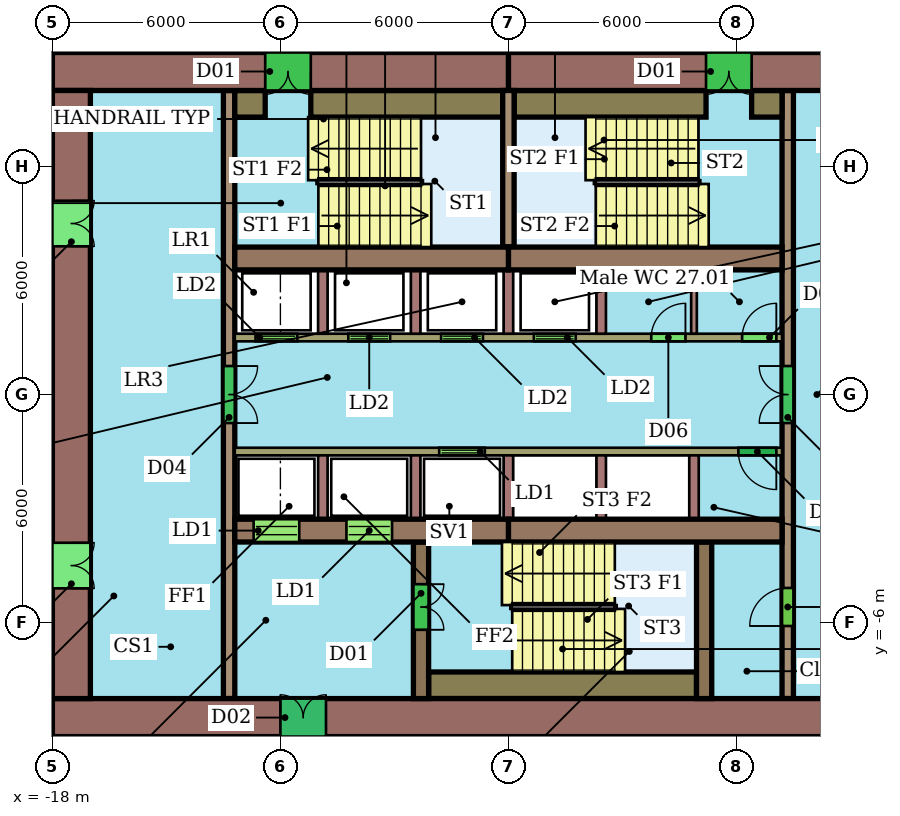
"""IFC4 building model, lengths in metres.
Left out: names, types, materials, properties, quantities, classifications, styles, units other than length and angle.
Written with IfcOpenShell. Run it as: python <this file> out.ifc"""

import sys

from ifc_helpers import new_model, si_unit, direction, frame, frame_2d, origin, place, context, subcontext, project, spatial, rectangle, extrude, element, fill, save


model = new_model("IFC4")
c1 = context("Model", 3, precision=1e-05, world=origin(), true_north=direction((0.0, 1.0)))
c2 = subcontext(c1, "Body", "Model", "MODEL_VIEW")
j1 = project(units=[si_unit("LENGTHUNIT", "METRE"), si_unit("PLANEANGLEUNIT", "RADIAN")], contexts=[c1])
p1 = place(None, origin())
s1 = spatial("IfcSite", under=j1, at=p1, CompositionType="ELEMENT")
p2 = place(p1, origin())
s2 = spatial("IfcBuilding", under=s1, at=p2, CompositionType="ELEMENT")
p3 = place(p2, frame((0.0, 0.0, 117.4)))
s3 = spatial("IfcBuildingStorey", under=s2, at=p3, CompositionType="ELEMENT", Elevation=117.4)
p4 = place(p3, frame((6.0, 8.5, 0.0), z_axis=(0.0, 0.0, 1.0), x_axis=(-1.0, 0.0, 0.0)))
e1 = element("IfcWall", 1, at=p4, inside=s3, PredefinedType="SHEAR", context=c2, shape_type="SweptSolid", body=[
    extrude(rectangle(XDim=12.0, YDim=1.0, at=frame_2d((6.0, 0.0))), origin(), (0.0, 0.0, 1.0), 3.3),
])
p5 = place(p4, frame((5.6, 0.0, 0.0)))
e2 = element("IfcOpeningElement", 2, at=p5, cuts=e1, PredefinedType="OPENING", context=c2, shape_type="SweptSolid", body=[
    extrude(rectangle(XDim=1.2, YDim=2.1, at=frame_2d((0.6, 1.05))), frame((0.0, 0.51, 0.0), z_axis=(0.0, -1.0, 0.0), x_axis=(1.0, 0.0, 0.0)), (0.0, 0.0, 1.0), 1.02),
])
p6 = place(p3, frame((-6.0, 8.5, 0.0), z_axis=(0.0, 0.0, 1.0), x_axis=(-1.0, 0.0, 0.0)))
e3 = element("IfcWall", 3, at=p6, inside=s3, PredefinedType="SHEAR", context=c2, shape_type="SweptSolid", body=[
    extrude(rectangle(XDim=12.0, YDim=1.0, at=frame_2d((6.0, 0.0))), origin(), (0.0, 0.0, 1.0), 3.3),
])
p7 = place(p6, frame((5.2, 0.0, 0.0)))
e4 = element("IfcOpeningElement", 4, at=p7, cuts=e3, PredefinedType="OPENING", context=c2, shape_type="SweptSolid", body=[
    extrude(rectangle(XDim=1.2, YDim=2.1, at=frame_2d((0.6, 1.05))), frame((0.0, 0.51, 0.0), z_axis=(0.0, -1.0, 0.0), x_axis=(1.0, 0.0, 0.0)), (0.0, 0.0, 1.0), 1.02),
])
p8 = place(p3, frame((-18.0, -8.5, 0.0), z_axis=(0.0, 0.0, 1.0), x_axis=(1.0, 0.0, 0.0)))
e5 = element("IfcWall", 5, at=p8, inside=s3, PredefinedType="SHEAR", context=c2, shape_type="SweptSolid", body=[
    extrude(rectangle(XDim=24.0, YDim=1.0, at=frame_2d((12.0, 0.0))), origin(), (0.0, 0.0, 1.0), 3.3),
])
p9 = place(p8, frame((6.0, 0.0, 0.0)))
e6 = element("IfcOpeningElement", 6, at=p9, cuts=e5, PredefinedType="OPENING", context=c2, shape_type="SweptSolid", body=[
    extrude(rectangle(XDim=1.2, YDim=2.1, at=frame_2d((0.6, 1.05))), frame((0.0, 0.51, 0.0), z_axis=(0.0, -1.0, 0.0), x_axis=(1.0, 0.0, 0.0)), (0.0, 0.0, 1.0), 1.02),
])
p10 = place(p3, frame((-17.5, 8.0, 0.0), z_axis=(0.0, 0.0, 1.0), x_axis=(0.0, -1.0, 0.0)))
e7 = element("IfcWall", 7, at=p10, inside=s3, PredefinedType="SHEAR", context=c2, shape_type="SweptSolid", body=[
    extrude(rectangle(XDim=16.0, YDim=1.0, at=frame_2d((8.0, 0.0))), origin(), (0.0, 0.0, 1.0), 3.3),
])
p11 = place(p10, frame((11.9, 0.0, 0.0)))
e8 = element("IfcOpeningElement", 8, at=p11, cuts=e7, PredefinedType="OPENING", context=c2, shape_type="SweptSolid", body=[
    extrude(rectangle(XDim=1.2, YDim=2.1, at=frame_2d((0.6, 1.05))), frame((0.0, 0.51, 0.0), z_axis=(0.0, -1.0, 0.0), x_axis=(1.0, 0.0, 0.0)), (0.0, 0.0, 1.0), 1.02),
])
p12 = place(p10, frame((2.9, 0.0, 0.0)))
e9 = element("IfcOpeningElement", 9, at=p12, cuts=e7, PredefinedType="OPENING", context=c2, shape_type="SweptSolid", body=[
    extrude(rectangle(XDim=1.2, YDim=2.1, at=frame_2d((0.6, 1.05))), frame((0.0, 0.51, 0.0), z_axis=(0.0, -1.0, 0.0), x_axis=(1.0, 0.0, 0.0)), (0.0, 0.0, 1.0), 1.02),
])
for number, where, z_axis, x_axis in (
    (10, (-13.2, 3.58, 0.0), (0.0, 0.0, 1.0), (1.0, 0.0, 0.0)),
    (11, (-6.0, 3.58, 0.0), (0.0, 0.0, 1.0), (1.0, 0.0, 0.0)),
):
    element("IfcWall", number, at=place(p3, frame(where, z_axis=z_axis, x_axis=x_axis)), inside=s3, PredefinedType="SHEAR", context=c2, shape_type="SweptSolid", body=[
        extrude(rectangle(XDim=7.2, YDim=0.6, at=frame_2d((3.6, 0.0))), origin(), (0.0, 0.0, 1.0), 3.3),
    ])
p13 = place(p3, frame((-13.2, -3.58, 0.0), z_axis=(0.0, 0.0, 1.0), x_axis=(1.0, 0.0, 0.0)))
e12 = element("IfcWall", 12, at=p13, inside=s3, PredefinedType="SHEAR", context=c2, shape_type="SweptSolid", body=[
    extrude(rectangle(XDim=7.2, YDim=0.6, at=frame_2d((3.6, 0.0))), origin(), (0.0, 0.0, 1.0), 3.3),
])
p14 = place(p13, frame((0.496, 0.0, 0.0)))
e13 = element("IfcOpeningElement", 13, at=p14, cuts=e12, PredefinedType="OPENING", context=c2, shape_type="SweptSolid", body=[
    extrude(rectangle(XDim=1.2, YDim=2.1, at=frame_2d((0.6, 1.05))), frame((0.0, 0.31, 0.0), z_axis=(0.0, -1.0, 0.0), x_axis=(1.0, 0.0, 0.0)), (0.0, 0.0, 1.0), 0.62),
])
p15 = place(p13, frame((2.938, 0.0, 0.0)))
e14 = element("IfcOpeningElement", 14, at=p15, cuts=e12, PredefinedType="OPENING", context=c2, shape_type="SweptSolid", body=[
    extrude(rectangle(XDim=1.2, YDim=2.1, at=frame_2d((0.6, 1.05))), frame((0.0, 0.31, 0.0), z_axis=(0.0, -1.0, 0.0), x_axis=(1.0, 0.0, 0.0)), (0.0, 0.0, 1.0), 0.62),
])
p16 = place(p3, frame((-6.0, -3.58, 0.0), z_axis=(0.0, 0.0, 1.0), x_axis=(1.0, 0.0, 0.0)))
e15 = element("IfcWall", 15, at=p16, inside=s3, PredefinedType="SHEAR", context=c2, shape_type="SweptSolid", body=[
    extrude(rectangle(XDim=7.2, YDim=0.6, at=frame_2d((3.6, 0.0))), origin(), (0.0, 0.0, 1.0), 3.3),
])
p17 = place(p3, frame((-13.35, 8.0, 0.0), z_axis=(0.0, 0.0, 1.0), x_axis=(0.0, -1.0, 0.0)))
e16 = element("IfcWall", 16, at=p17, inside=s3, PredefinedType="SHEAR", context=c2, shape_type="SweptSolid", body=[
    extrude(rectangle(XDim=16.0, YDim=0.3, at=frame_2d((8.0, 0.0))), origin(), (0.0, 0.0, 1.0), 3.3),
])
p18 = place(p17, frame((7.25, 0.0, 0.0)))
e17 = element("IfcOpeningElement", 17, at=p18, cuts=e16, PredefinedType="OPENING", context=c2, shape_type="SweptSolid", body=[
    extrude(rectangle(XDim=1.5, YDim=2.1, at=frame_2d((0.75, 1.05))), frame((0.0, 0.16, 0.0), z_axis=(0.0, -1.0, 0.0), x_axis=(1.0, 0.0, 0.0)), (0.0, 0.0, 1.0), 0.32),
])
p19 = place(p3, frame((1.35, -8.0, 0.0), z_axis=(0.0, 0.0, 1.0), x_axis=(0.0, 1.0, 0.0)))
e18 = element("IfcWall", 18, at=p19, inside=s3, PredefinedType="SHEAR", context=c2, shape_type="SweptSolid", body=[
    extrude(rectangle(XDim=16.0, YDim=0.3, at=frame_2d((8.0, 0.0))), origin(), (0.0, 0.0, 1.0), 3.3),
])
p20 = place(p19, frame((1.91, 0.0, 0.0)))
e19 = element("IfcOpeningElement", 19, at=p20, cuts=e18, PredefinedType="OPENING", context=c2, shape_type="SweptSolid", body=[
    extrude(rectangle(XDim=1.0, YDim=2.1, at=frame_2d((0.5, 1.05))), frame((0.0, 0.16, 0.0), z_axis=(0.0, -1.0, 0.0), x_axis=(1.0, 0.0, 0.0)), (0.0, 0.0, 1.0), 0.32),
])
p21 = place(p19, frame((7.25, 0.0, 0.0)))
e20 = element("IfcOpeningElement", 20, at=p21, cuts=e18, PredefinedType="OPENING", context=c2, shape_type="SweptSolid", body=[
    extrude(rectangle(XDim=1.5, YDim=2.1, at=frame_2d((0.75, 1.05))), frame((0.0, 0.16, 0.0), z_axis=(0.0, -1.0, 0.0), x_axis=(1.0, 0.0, 0.0)), (0.0, 0.0, 1.0), 0.32),
])
p22 = place(p3, frame((-13.2, 1.5, 0.0), z_axis=(0.0, 0.0, 1.0), x_axis=(1.0, 0.0, 0.0)))
e21 = element("IfcWall", 21, at=p22, inside=s3, PredefinedType="SHEAR", context=c2, shape_type="SweptSolid", body=[
    extrude(rectangle(XDim=14.4, YDim=0.2, at=frame_2d((7.2, 0.0))), origin(), (0.0, 0.0, 1.0), 3.3),
])
p23 = place(p22, frame((0.546, 0.0, 0.0)))
e22 = element("IfcOpeningElement", 22, at=p23, cuts=e21, PredefinedType="OPENING", context=c2, shape_type="SweptSolid", body=[
    extrude(rectangle(XDim=1.1, YDim=2.1, at=frame_2d((0.55, 1.05))), frame((0.0, 0.11, 0.0), z_axis=(0.0, -1.0, 0.0), x_axis=(1.0, 0.0, 0.0)), (0.0, 0.0, 1.0), 0.22),
])
p24 = place(p22, frame((2.988, 0.0, 0.0)))
e23 = element("IfcOpeningElement", 23, at=p24, cuts=e21, PredefinedType="OPENING", context=c2, shape_type="SweptSolid", body=[
    extrude(rectangle(XDim=1.1, YDim=2.1, at=frame_2d((0.55, 1.05))), frame((0.0, 0.11, 0.0), z_axis=(0.0, -1.0, 0.0), x_axis=(1.0, 0.0, 0.0)), (0.0, 0.0, 1.0), 0.22),
])
p25 = place(p22, frame((5.429, 0.0, 0.0)))
e24 = element("IfcOpeningElement", 24, at=p25, cuts=e21, PredefinedType="OPENING", context=c2, shape_type="SweptSolid", body=[
    extrude(rectangle(XDim=1.1, YDim=2.1, at=frame_2d((0.55, 1.05))), frame((0.0, 0.11, 0.0), z_axis=(0.0, -1.0, 0.0), x_axis=(1.0, 0.0, 0.0)), (0.0, 0.0, 1.0), 0.22),
])
p26 = place(p22, frame((7.871, 0.0, 0.0)))
e25 = element("IfcOpeningElement", 25, at=p26, cuts=e21, PredefinedType="OPENING", context=c2, shape_type="SweptSolid", body=[
    extrude(rectangle(XDim=1.1, YDim=2.1, at=frame_2d((0.55, 1.05))), frame((0.0, 0.11, 0.0), z_axis=(0.0, -1.0, 0.0), x_axis=(1.0, 0.0, 0.0)), (0.0, 0.0, 1.0), 0.22),
])
p27 = place(p22, frame((10.958, 0.0, 0.0)))
e26 = element("IfcOpeningElement", 26, at=p27, cuts=e21, PredefinedType="OPENING", context=c2, shape_type="SweptSolid", body=[
    extrude(rectangle(XDim=0.9, YDim=2.1, at=frame_2d((0.45, 1.05))), frame((0.0, 0.11, 0.0), z_axis=(0.0, -1.0, 0.0), x_axis=(1.0, 0.0, 0.0)), (0.0, 0.0, 1.0), 0.22),
])
p28 = place(p22, frame((13.35, 0.0, 0.0)))
e27 = element("IfcOpeningElement", 27, at=p28, cuts=e21, PredefinedType="OPENING", context=c2, shape_type="SweptSolid", body=[
    extrude(rectangle(XDim=0.9, YDim=2.1, at=frame_2d((0.45, 1.05))), frame((0.0, 0.11, 0.0), z_axis=(0.0, -1.0, 0.0), x_axis=(1.0, 0.0, 0.0)), (0.0, 0.0, 1.0), 0.22),
])
p29 = place(p3, frame((1.2, -1.5, 0.0), z_axis=(0.0, 0.0, 1.0), x_axis=(-1.0, 0.0, 0.0)))
e28 = element("IfcWall", 28, at=p29, inside=s3, PredefinedType="SHEAR", context=c2, shape_type="SweptSolid", body=[
    extrude(rectangle(XDim=14.4, YDim=0.2, at=frame_2d((7.2, 0.0))), origin(), (0.0, 0.0, 1.0), 3.3),
])
p30 = place(p29, frame((7.821, 0.0, 0.0)))
e29 = element("IfcOpeningElement", 29, at=p30, cuts=e28, PredefinedType="OPENING", context=c2, shape_type="SweptSolid", body=[
    extrude(rectangle(XDim=1.2, YDim=2.1, at=frame_2d((0.6, 1.05))), frame((0.0, 0.11, 0.0), z_axis=(0.0, -1.0, 0.0), x_axis=(1.0, 0.0, 0.0)), (0.0, 0.0, 1.0), 0.22),
])
p31 = place(p29, frame((0.15, 0.0, 0.0)))
e30 = element("IfcOpeningElement", 30, at=p31, cuts=e28, PredefinedType="OPENING", context=c2, shape_type="SweptSolid", body=[
    extrude(rectangle(XDim=1.0, YDim=2.1, at=frame_2d((0.5, 1.05))), frame((0.0, 0.11, 0.0), z_axis=(0.0, -1.0, 0.0), x_axis=(1.0, 0.0, 0.0)), (0.0, 0.0, 1.0), 0.22),
])
p32 = place(p3, frame((-8.3, -3.88, 0.0), z_axis=(0.0, 0.0, 1.0), x_axis=(0.0, -1.0, 0.0)))
e31 = element("IfcWall", 31, at=p32, inside=s3, PredefinedType="SHEAR", context=c2, shape_type="SweptSolid", body=[
    extrude(rectangle(XDim=4.12, YDim=0.4, at=frame_2d((2.06, 0.0))), origin(), (0.0, 0.0, 1.0), 3.3),
])
p33 = place(p32, frame((1.11, 0.0, 0.0)))
e32 = element("IfcOpeningElement", 32, at=p33, cuts=e31, PredefinedType="OPENING", context=c2, shape_type="SweptSolid", body=[
    extrude(rectangle(XDim=1.2, YDim=2.1, at=frame_2d((0.6, 1.05))), frame((0.0, 0.21, 0.0), z_axis=(0.0, -1.0, 0.0), x_axis=(1.0, 0.0, 0.0)), (0.0, 0.0, 1.0), 0.42),
])
p34 = place(p3, frame((-0.85, -3.88, 0.0), z_axis=(0.0, 0.0, 1.0), x_axis=(0.0, -1.0, 0.0)))
e33 = element("IfcWall", 33, at=p34, inside=s3, PredefinedType="SHEAR", context=c2, shape_type="SweptSolid", body=[
    extrude(rectangle(XDim=4.12, YDim=0.4, at=frame_2d((2.06, 0.0))), origin(), (0.0, 0.0, 1.0), 3.3),
])
p35 = place(p3, frame((-6.0, 3.88, 0.0), z_axis=(0.0, 0.0, 1.0), x_axis=(0.0, 1.0, 0.0)))
e34 = element("IfcWall", 34, at=p35, inside=s3, PredefinedType="SHEAR", context=c2, shape_type="SweptSolid", body=[
    extrude(rectangle(XDim=4.12, YDim=0.3, at=frame_2d((2.06, 0.0))), origin(), (0.0, 0.0, 1.0), 3.3),
])
p36 = place(p3, frame((-13.2, 7.65, 0.0), z_axis=(0.0, 0.0, 1.0), x_axis=(1.0, 0.0, 0.0)))
e35 = element("IfcWall", 35, at=p36, inside=s3, PredefinedType="SHEAR", context=c2, shape_type="SweptSolid", body=[
    extrude(rectangle(XDim=0.8, YDim=0.7, at=frame_2d((0.4, 0.0))), origin(), (0.0, 0.0, 1.0), 3.3),
])
for number, where, z_axis, x_axis in (
    (36, (-11.2, 7.65, 0.0), (0.0, 0.0, 1.0), (1.0, 0.0, 0.0)),
    (37, (-5.85, 7.65, 0.0), (0.0, 0.0, 1.0), (1.0, 0.0, 0.0)),
):
    element("IfcWall", number, at=place(p3, frame(where, z_axis=z_axis, x_axis=x_axis)), inside=s3, PredefinedType="SHEAR", context=c2, shape_type="SweptSolid", body=[
        extrude(rectangle(XDim=5.05, YDim=0.7, at=frame_2d((2.525, 0.0))), origin(), (0.0, 0.0, 1.0), 3.3),
    ])
p37 = place(p3, frame((0.4, 7.65, 0.0), z_axis=(0.0, 0.0, 1.0), x_axis=(1.0, 0.0, 0.0)))
e38 = element("IfcWall", 38, at=p37, inside=s3, PredefinedType="SHEAR", context=c2, shape_type="SweptSolid", body=[
    extrude(rectangle(XDim=0.8, YDim=0.7, at=frame_2d((0.4, 0.0))), origin(), (0.0, 0.0, 1.0), 3.3),
])
p38 = place(p3, frame((-8.1, -7.65, 0.0), z_axis=(0.0, 0.0, 1.0), x_axis=(1.0, 0.0, 0.0)))
e39 = element("IfcWall", 39, at=p38, inside=s3, PredefinedType="SHEAR", context=c2, shape_type="SweptSolid", body=[
    extrude(rectangle(XDim=7.05, YDim=0.7, at=frame_2d((3.525, 0.0))), origin(), (0.0, 0.0, 1.0), 3.3),
])
for number, where, z_axis, x_axis in (
    (40, (-10.883, 1.6, 0.0), (0.0, 0.0, 1.0), (0.0, 1.0, 0.0)),
    (41, (-8.442, 1.6, 0.0), (0.0, 0.0, 1.0), (0.0, 1.0, 0.0)),
    (42, (-6.0, 1.6, 0.0), (0.0, 0.0, 1.0), (0.0, 1.0, 0.0)),
    (43, (-3.558, 1.6, 0.0), (0.0, 0.0, 1.0), (0.0, 1.0, 0.0)),
):
    element("IfcWall", number, at=place(p3, frame(where, z_axis=z_axis, x_axis=x_axis)), inside=s3, PredefinedType="SHEAR", context=c2, shape_type="SweptSolid", body=[
        extrude(rectangle(XDim=1.68, YDim=0.25, at=frame_2d((0.84, 0.0))), origin(), (0.0, 0.0, 1.0), 3.3),
    ])
p39 = place(p3, frame((-1.117, 1.6, 0.0), z_axis=(0.0, 0.0, 1.0), x_axis=(0.0, 1.0, 0.0)))
e44 = element("IfcWall", 44, at=p39, inside=s3, PredefinedType="PARTITIONING", context=c2, shape_type="SweptSolid", body=[
    extrude(rectangle(XDim=1.68, YDim=0.15, at=frame_2d((0.84, 0.0))), origin(), (0.0, 0.0, 1.0), 3.3),
])
for number, where, z_axis, x_axis in (
    (45, (-10.883, -1.6, 0.0), (0.0, 0.0, 1.0), (0.0, -1.0, 0.0)),
    (46, (-8.442, -1.6, 0.0), (0.0, 0.0, 1.0), (0.0, -1.0, 0.0)),
    (47, (-6.0, -1.6, 0.0), (0.0, 0.0, 1.0), (0.0, -1.0, 0.0)),
    (48, (-3.558, -1.6, 0.0), (0.0, 0.0, 1.0), (0.0, -1.0, 0.0)),
    (49, (-1.117, -1.6, 0.0), (0.0, 0.0, 1.0), (0.0, -1.0, 0.0)),
):
    element("IfcWall", number, at=place(p3, frame(where, z_axis=z_axis, x_axis=x_axis)), inside=s3, PredefinedType="SHEAR", context=c2, shape_type="SweptSolid", body=[
        extrude(rectangle(XDim=1.68, YDim=0.25, at=frame_2d((0.84, 0.0))), origin(), (0.0, 0.0, 1.0), 3.3),
    ])
p40 = place(p5, origin())
e50 = element("IfcDoor", 50, at=p40, inside=s3, OperationType="DOUBLE_DOOR_SINGLE_SWING", PredefinedType="NOTDEFINED", context=c2, shape_type="SweptSolid", body=[
    extrude(rectangle(XDim=1.2, YDim=2.1, at=frame_2d((0.6, 1.05))), frame((0.0, 0.025, 0.0), z_axis=(0.0, -1.0, 0.0), x_axis=(1.0, 0.0, 0.0)), (0.0, 0.0, 1.0), 0.05),
])
fill(e2, e50)
p41 = place(p7, origin())
e51 = element("IfcDoor", 51, at=p41, inside=s3, OperationType="DOUBLE_DOOR_SINGLE_SWING", PredefinedType="NOTDEFINED", context=c2, shape_type="SweptSolid", body=[
    extrude(rectangle(XDim=1.2, YDim=2.1, at=frame_2d((0.6, 1.05))), frame((0.0, 0.025, 0.0), z_axis=(0.0, -1.0, 0.0), x_axis=(1.0, 0.0, 0.0)), (0.0, 0.0, 1.0), 0.05),
])
fill(e4, e51)
p42 = place(p9, origin())
e52 = element("IfcDoor", 52, at=p42, inside=s3, OperationType="DOUBLE_DOOR_SINGLE_SWING", PredefinedType="NOTDEFINED", context=c2, shape_type="SweptSolid", body=[
    extrude(rectangle(XDim=1.2, YDim=2.1, at=frame_2d((0.6, 1.05))), frame((0.0, 0.025, 0.0), z_axis=(0.0, -1.0, 0.0), x_axis=(1.0, 0.0, 0.0)), (0.0, 0.0, 1.0), 0.05),
])
fill(e6, e52)
p43 = place(p11, origin())
e53 = element("IfcDoor", 53, at=p43, inside=s3, OperationType="DOUBLE_DOOR_SINGLE_SWING", PredefinedType="NOTDEFINED", context=c2, shape_type="SweptSolid", body=[
    extrude(rectangle(XDim=1.2, YDim=2.1, at=frame_2d((0.6, 1.05))), frame((0.0, 0.025, 0.0), z_axis=(0.0, -1.0, 0.0), x_axis=(1.0, 0.0, 0.0)), (0.0, 0.0, 1.0), 0.05),
])
fill(e8, e53)
p44 = place(p12, origin())
e54 = element("IfcDoor", 54, at=p44, inside=s3, OperationType="DOUBLE_DOOR_SINGLE_SWING", PredefinedType="NOTDEFINED", context=c2, shape_type="SweptSolid", body=[
    extrude(rectangle(XDim=1.2, YDim=2.1, at=frame_2d((0.6, 1.05))), frame((0.0, 0.025, 0.0), z_axis=(0.0, -1.0, 0.0), x_axis=(1.0, 0.0, 0.0)), (0.0, 0.0, 1.0), 0.05),
])
fill(e9, e54)
p45 = place(p14, origin())
e55 = element("IfcDoor", 55, at=p45, inside=s3, OperationType="DOUBLE_DOOR_SLIDING", PredefinedType="NOTDEFINED", context=c2, shape_type="SweptSolid", body=[
    extrude(rectangle(XDim=1.2, YDim=2.1, at=frame_2d((0.6, 1.05))), frame((0.0, 0.025, 0.0), z_axis=(0.0, -1.0, 0.0), x_axis=(1.0, 0.0, 0.0)), (0.0, 0.0, 1.0), 0.05),
])
fill(e13, e55)
p46 = place(p15, origin())
e56 = element("IfcDoor", 56, at=p46, inside=s3, OperationType="DOUBLE_DOOR_SLIDING", PredefinedType="NOTDEFINED", context=c2, shape_type="SweptSolid", body=[
    extrude(rectangle(XDim=1.2, YDim=2.1, at=frame_2d((0.6, 1.05))), frame((0.0, 0.025, 0.0), z_axis=(0.0, -1.0, 0.0), x_axis=(1.0, 0.0, 0.0)), (0.0, 0.0, 1.0), 0.05),
])
fill(e14, e56)
p47 = place(p18, origin())
e57 = element("IfcDoor", 57, at=p47, inside=s3, OperationType="DOUBLE_DOOR_SINGLE_SWING", PredefinedType="NOTDEFINED", context=c2, shape_type="SweptSolid", body=[
    extrude(rectangle(XDim=1.5, YDim=2.1, at=frame_2d((0.75, 1.05))), frame((0.0, 0.025, 0.0), z_axis=(0.0, -1.0, 0.0), x_axis=(1.0, 0.0, 0.0)), (0.0, 0.0, 1.0), 0.05),
])
fill(e17, e57)
p48 = place(p20, origin())
e58 = element("IfcDoor", 58, at=p48, inside=s3, OperationType="SINGLE_SWING_LEFT", PredefinedType="NOTDEFINED", context=c2, shape_type="SweptSolid", body=[
    extrude(rectangle(XDim=1.0, YDim=2.1, at=frame_2d((0.5, 1.05))), frame((0.0, 0.025, 0.0), z_axis=(0.0, -1.0, 0.0), x_axis=(1.0, 0.0, 0.0)), (0.0, 0.0, 1.0), 0.05),
])
fill(e19, e58)
p49 = place(p21, origin())
e59 = element("IfcDoor", 59, at=p49, inside=s3, OperationType="DOUBLE_DOOR_SINGLE_SWING", PredefinedType="NOTDEFINED", context=c2, shape_type="SweptSolid", body=[
    extrude(rectangle(XDim=1.5, YDim=2.1, at=frame_2d((0.75, 1.05))), frame((0.0, 0.025, 0.0), z_axis=(0.0, -1.0, 0.0), x_axis=(1.0, 0.0, 0.0)), (0.0, 0.0, 1.0), 0.05),
])
fill(e20, e59)
p50 = place(p23, origin())
e60 = element("IfcDoor", 60, at=p50, inside=s3, OperationType="DOUBLE_DOOR_SLIDING", PredefinedType="NOTDEFINED", context=c2, shape_type="SweptSolid", body=[
    extrude(rectangle(XDim=1.1, YDim=2.1, at=frame_2d((0.55, 1.05))), frame((0.0, 0.025, 0.0), z_axis=(0.0, -1.0, 0.0), x_axis=(1.0, 0.0, 0.0)), (0.0, 0.0, 1.0), 0.05),
])
fill(e22, e60)
p51 = place(p24, origin())
e61 = element("IfcDoor", 61, at=p51, inside=s3, OperationType="DOUBLE_DOOR_SLIDING", PredefinedType="NOTDEFINED", context=c2, shape_type="SweptSolid", body=[
    extrude(rectangle(XDim=1.1, YDim=2.1, at=frame_2d((0.55, 1.05))), frame((0.0, 0.025, 0.0), z_axis=(0.0, -1.0, 0.0), x_axis=(1.0, 0.0, 0.0)), (0.0, 0.0, 1.0), 0.05),
])
fill(e23, e61)
p52 = place(p25, origin())
e62 = element("IfcDoor", 62, at=p52, inside=s3, OperationType="DOUBLE_DOOR_SLIDING", PredefinedType="NOTDEFINED", context=c2, shape_type="SweptSolid", body=[
    extrude(rectangle(XDim=1.1, YDim=2.1, at=frame_2d((0.55, 1.05))), frame((0.0, 0.025, 0.0), z_axis=(0.0, -1.0, 0.0), x_axis=(1.0, 0.0, 0.0)), (0.0, 0.0, 1.0), 0.05),
])
fill(e24, e62)
p53 = place(p26, origin())
e63 = element("IfcDoor", 63, at=p53, inside=s3, OperationType="DOUBLE_DOOR_SLIDING", PredefinedType="NOTDEFINED", context=c2, shape_type="SweptSolid", body=[
    extrude(rectangle(XDim=1.1, YDim=2.1, at=frame_2d((0.55, 1.05))), frame((0.0, 0.025, 0.0), z_axis=(0.0, -1.0, 0.0), x_axis=(1.0, 0.0, 0.0)), (0.0, 0.0, 1.0), 0.05),
])
fill(e25, e63)
p54 = place(p27, origin())
e64 = element("IfcDoor", 64, at=p54, inside=s3, OperationType="SINGLE_SWING_RIGHT", PredefinedType="NOTDEFINED", context=c2, shape_type="SweptSolid", body=[
    extrude(rectangle(XDim=0.9, YDim=2.1, at=frame_2d((0.45, 1.05))), frame((0.0, 0.025, 0.0), z_axis=(0.0, -1.0, 0.0), x_axis=(1.0, 0.0, 0.0)), (0.0, 0.0, 1.0), 0.05),
])
fill(e26, e64)
p55 = place(p28, origin())
e65 = element("IfcDoor", 65, at=p55, inside=s3, OperationType="SINGLE_SWING_RIGHT", PredefinedType="NOTDEFINED", context=c2, shape_type="SweptSolid", body=[
    extrude(rectangle(XDim=0.9, YDim=2.1, at=frame_2d((0.45, 1.05))), frame((0.0, 0.025, 0.0), z_axis=(0.0, -1.0, 0.0), x_axis=(1.0, 0.0, 0.0)), (0.0, 0.0, 1.0), 0.05),
])
fill(e27, e65)
p56 = place(p30, origin())
e66 = element("IfcDoor", 66, at=p56, inside=s3, OperationType="DOUBLE_DOOR_SLIDING", PredefinedType="NOTDEFINED", context=c2, shape_type="SweptSolid", body=[
    extrude(rectangle(XDim=1.2, YDim=2.1, at=frame_2d((0.6, 1.05))), frame((0.0, 0.025, 0.0), z_axis=(0.0, -1.0, 0.0), x_axis=(1.0, 0.0, 0.0)), (0.0, 0.0, 1.0), 0.05),
])
fill(e29, e66)
p57 = place(p31, origin())
e67 = element("IfcDoor", 67, at=p57, inside=s3, OperationType="SINGLE_SWING_LEFT", PredefinedType="NOTDEFINED", context=c2, shape_type="SweptSolid", body=[
    extrude(rectangle(XDim=1.0, YDim=2.1, at=frame_2d((0.5, 1.05))), frame((0.0, 0.025, 0.0), z_axis=(0.0, -1.0, 0.0), x_axis=(1.0, 0.0, 0.0)), (0.0, 0.0, 1.0), 0.05),
])
fill(e30, e67)
p58 = place(p33, origin())
e68 = element("IfcDoor", 68, at=p58, inside=s3, OperationType="DOUBLE_DOOR_SINGLE_SWING", PredefinedType="NOTDEFINED", context=c2, shape_type="SweptSolid", body=[
    extrude(rectangle(XDim=1.2, YDim=2.1, at=frame_2d((0.6, 1.05))), frame((0.0, 0.025, 0.0), z_axis=(0.0, -1.0, 0.0), x_axis=(1.0, 0.0, 0.0)), (0.0, 0.0, 1.0), 0.05),
])
fill(e32, e68)
save(model, sys.argv[1])
